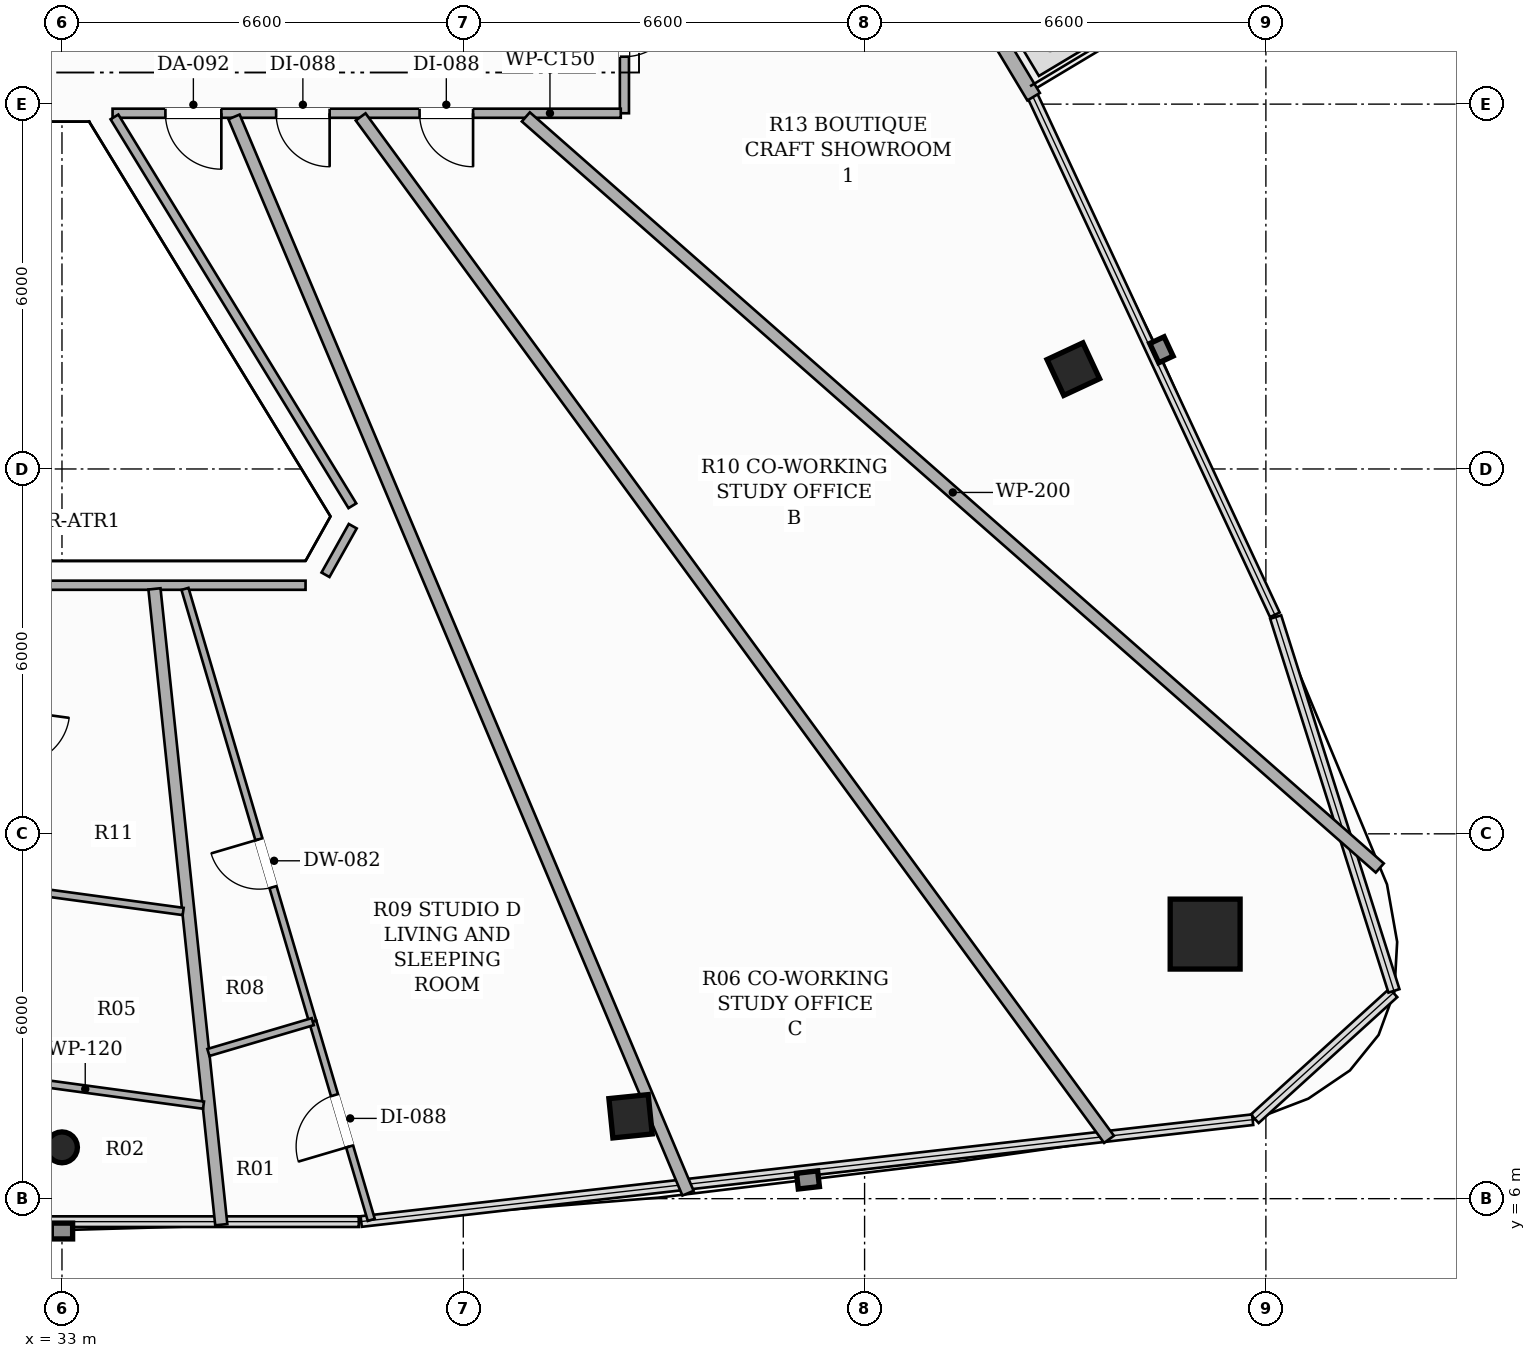
"""IFC4 building model, lengths in metres.
Left out: names, types, materials, properties, quantities, classifications, styles, units other than length and angle.
Written with IfcOpenShell. Run it as: python <this file> out.ifc"""

import sys

from ifc_helpers import new_model, si_unit, direction, frame, frame_2d, origin, origin_2d, place, context, subcontext, project, spatial, rectangle, hollow_rectangle, hollow_circle, extrude, element, fill, save


model = new_model("IFC4")
c1 = context("Model", 3, precision=1e-05, world=origin(), true_north=direction((0.0, 1.0)))
c2 = subcontext(c1, "Body", "Model", "MODEL_VIEW")
j1 = project(units=[si_unit("LENGTHUNIT", "METRE"), si_unit("PLANEANGLEUNIT", "RADIAN")], contexts=[c1])
p1 = place(None, origin())
s1 = spatial("IfcSite", under=j1, at=p1, CompositionType="ELEMENT")
p2 = place(p1, origin())
s2 = spatial("IfcBuilding", under=s1, at=p2, CompositionType="ELEMENT")
p3 = place(p2, frame((0.0, 0.0, 263.45)))
s3 = spatial("IfcBuildingStorey", under=s2, at=p3, CompositionType="ELEMENT", Elevation=263.45)
p4 = place(p3, frame((51.801, 10.351, 0.0), z_axis=(0.0, 0.0, 1.0), x_axis=(1.0, 0.0, 0.0)))
e1 = element("IfcColumn", 1, at=p4, inside=s3, PredefinedType="COLUMN", context=c2, shape_type="SweptSolid", body=[
    extrude(hollow_rectangle(XDim=1.15, YDim=1.15, WallThickness=0.036, at=origin_2d()), origin(), (0.0, 0.0, 1.0), 3.3),
])
p5 = place(p3, frame((33.0, 6.844, 0.0), z_axis=(0.0, 0.0, 1.0), x_axis=(1.0, 0.0, 0.0)))
e2 = element("IfcColumn", 2, at=p5, inside=s3, PredefinedType="COLUMN", context=c2, shape_type="SweptSolid", body=[
    extrude(hollow_circle(Radius=0.254, WallThickness=0.016, at=origin_2d()), origin(), (0.0, 0.0, 1.0), 3.3),
])
for number, where, z_axis, x_axis in (
    (3, (42.351, 7.355, 0.0), (0.0, 0.0, 1.0), (0.995, 0.101, 0.0)),
    (4, (49.633, 19.642, 0.0), (0.0, 0.0, 1.0), (-0.423, 0.906, 0.0)),
):
    element("IfcColumn", number, at=place(p3, frame(where, z_axis=z_axis, x_axis=x_axis)), inside=s3, PredefinedType="COLUMN", context=c2, shape_type="SweptSolid", body=[
        extrude(hollow_rectangle(XDim=0.65, YDim=0.65, WallThickness=0.022, at=origin_2d()), origin(), (0.0, 0.0, 1.0), 3.3),
    ])
p6 = place(p3, frame((48.98, 24.122, 0.0), z_axis=(0.0, 0.0, 1.0), x_axis=(-0.514361929684, 0.857573206958, 0.0)))
e5 = element("IfcWall", 5, at=p6, inside=s3, PredefinedType="SOLIDWALL", context=c2, shape_type="SweptSolid", body=[
    extrude(rectangle(XDim=9.659, YDim=0.24, at=frame_2d((4.829, 0.0))), origin(), (0.0, 0.0, 1.0), 2.624),
])
p7 = place(p6, frame((7.162, 0.0, 0.0)))
e6 = element("IfcOpeningElement", 6, at=p7, cuts=e5, PredefinedType="OPENING", context=c2, shape_type="SweptSolid", body=[
    extrude(rectangle(XDim=1.8, YDim=2.2, at=frame_2d((0.9, 1.1))), frame((0.0, 0.13, 0.0), z_axis=(0.0, -1.0, 0.0), x_axis=(1.0, 0.0, 0.0)), (0.0, 0.0, 1.0), 0.26),
])
p8 = place(p3, frame((42.25, 26.59, 0.0), z_axis=(0.0, 0.0, 1.0), x_axis=(0.0, -1.0, 0.0)))
e7 = element("IfcWall", 7, at=p8, inside=s3, PredefinedType="PARTITIONING", context=c2, shape_type="SweptSolid", body=[
    extrude(rectangle(XDim=2.74, YDim=0.15, at=frame_2d((1.37, 0.0))), origin(), (0.0, 0.0, 1.0), 2.773),
])
p9 = place(p8, frame((0.93, 0.0, 0.0)))
e8 = element("IfcOpeningElement", 8, at=p9, cuts=e7, PredefinedType="OPENING", context=c2, shape_type="SweptSolid", body=[
    extrude(rectangle(XDim=0.88, YDim=2.1, at=frame_2d((0.44, 1.05))), frame((0.0, 0.085, 0.0), z_axis=(0.0, -1.0, 0.0), x_axis=(1.0, 0.0, 0.0)), (0.0, 0.0, 1.0), 0.17),
])
p10 = place(p3, frame((42.19, 23.85, 0.0), z_axis=(0.0, 0.0, 1.0), x_axis=(-1.0, 0.0, 0.0)))
e9 = element("IfcWall", 9, at=p10, inside=s3, PredefinedType="PARTITIONING", context=c2, shape_type="SweptSolid", body=[
    extrude(rectangle(XDim=8.358, YDim=0.15, at=frame_2d((4.179, 0.0))), origin(), (0.0, 0.0, 1.0), 2.565),
])
p11 = place(p10, frame((2.429, 0.0, 0.0)))
e10 = element("IfcOpeningElement", 10, at=p11, cuts=e9, PredefinedType="OPENING", context=c2, shape_type="SweptSolid", body=[
    extrude(rectangle(XDim=0.88, YDim=2.1, at=frame_2d((0.44, 1.05))), frame((0.0, 0.085, 0.0), z_axis=(0.0, -1.0, 0.0), x_axis=(1.0, 0.0, 0.0)), (0.0, 0.0, 1.0), 0.17),
])
p12 = place(p10, frame((4.788, 0.0, 0.0)))
e11 = element("IfcOpeningElement", 11, at=p12, cuts=e9, PredefinedType="OPENING", context=c2, shape_type="SweptSolid", body=[
    extrude(rectangle(XDim=0.88, YDim=2.1, at=frame_2d((0.44, 1.05))), frame((0.0, 0.085, 0.0), z_axis=(0.0, -1.0, 0.0), x_axis=(1.0, 0.0, 0.0)), (0.0, 0.0, 1.0), 0.17),
])
p13 = place(p10, frame((6.569, 0.0, 0.0)))
e12 = element("IfcOpeningElement", 12, at=p13, cuts=e9, PredefinedType="OPENING", context=c2, shape_type="SweptSolid", body=[
    extrude(rectangle(XDim=0.92, YDim=2.15, at=frame_2d((0.46, 1.075))), frame((0.0, 0.085, 0.0), z_axis=(0.0, -1.0, 0.0), x_axis=(1.0, 0.0, 0.0)), (0.0, 0.0, 1.0), 0.17),
])
p14 = place(p3, frame((33.863, 23.79, 0.0), z_axis=(0.0, 0.0, 1.0), x_axis=(0.521913594497, -0.852998358661, 0.0)))
e13 = element("IfcWall", 13, at=p14, inside=s3, PredefinedType="PARTITIONING", context=c2, shape_type="SweptSolid", body=[
    extrude(rectangle(XDim=7.497, YDim=0.15, at=frame_2d((3.749, 0.0))), origin(), (0.0, 0.0, 1.0), 2.773),
])
p15 = place(p3, frame((37.782, 17.059, 0.0), z_axis=(0.0, 0.0, 1.0), x_axis=(-0.489033415255, -0.872265050752, 0.0)))
e14 = element("IfcWall", 14, at=p15, inside=s3, PredefinedType="PARTITIONING", context=c2, shape_type="SweptSolid", body=[
    extrude(rectangle(XDim=0.916, YDim=0.15, at=frame_2d((0.458, 0.0))), origin(), (0.0, 0.0, 1.0), 3.06),
])
p16 = place(p3, frame((37.006, 16.088, 0.0), z_axis=(0.0, 0.0, 1.0), x_axis=(-1.0, 0.0, 0.0)))
e15 = element("IfcWall", 15, at=p16, inside=s3, PredefinedType="PARTITIONING", context=c2, shape_type="SweptSolid", body=[
    extrude(rectangle(XDim=8.012, YDim=0.15, at=frame_2d((4.006, 0.0))), origin(), (0.0, 0.0, 1.0), 2.773),
])
p17 = place(p3, frame((54.673, 11.438, 0.0), z_axis=(0.0, 0.0, 1.0), x_axis=(-0.750894752688, 0.660421888179, 0.0)))
e16 = element("IfcWall", 16, at=p17, inside=s3, PredefinedType="PARTITIONING", context=c2, shape_type="SweptSolid", body=[
    extrude(rectangle(XDim=18.703, YDim=0.2, at=frame_2d((9.352, 0.0))), origin(), (0.0, 0.0, 1.0), 2.492),
])
p18 = place(p3, frame((34.521, 16.028, 0.0), z_axis=(0.0, 0.0, 1.0), x_axis=(0.104542147599, -0.994520456992, 0.0)))
e17 = element("IfcWall", 17, at=p18, inside=s3, PredefinedType="PARTITIONING", context=c2, shape_type="SweptSolid", body=[
    extrude(rectangle(XDim=10.514, YDim=0.2, at=frame_2d((5.257, 0.0))), origin(), (0.0, 0.0, 1.0), 2.492),
])
p19 = place(p3, frame((50.22, 6.976, 0.0), z_axis=(0.0, 0.0, 1.0), x_axis=(-0.59066502199, 0.80691686796, 0.0)))
e18 = element("IfcWall", 18, at=p19, inside=s3, PredefinedType="PARTITIONING", context=c2, shape_type="SweptSolid", body=[
    extrude(rectangle(XDim=20.837, YDim=0.2, at=frame_2d((10.419, 0.0))), origin(), (0.0, 0.0, 1.0), 2.492),
])
p20 = place(p3, frame((43.296, 6.09, 0.0), z_axis=(0.0, 0.0, 1.0), x_axis=(-0.388640997534, 0.921389263578, 0.0)))
e19 = element("IfcWall", 19, at=p20, inside=s3, PredefinedType="PARTITIONING", context=c2, shape_type="SweptSolid", body=[
    extrude(rectangle(XDim=19.21, YDim=0.2, at=frame_2d((9.605, 0.0))), origin(), (0.0, 0.0, 1.0), 2.492),
])
p21 = place(p3, frame((35.328, 7.538, 0.0), z_axis=(0.0, 0.0, 1.0), x_axis=(-0.990890227425, 0.134672035678, 0.0)))
e20 = element("IfcWall", 20, at=p21, inside=s3, PredefinedType="PARTITIONING", context=c2, shape_type="SweptSolid", body=[
    extrude(rectangle(XDim=3.927, YDim=0.12, at=frame_2d((1.963, 0.0))), origin(), (0.0, 0.0, 1.0), 2.773),
])
p22 = place(p3, frame((31.856, 11.15, 0.0), z_axis=(0.0, 0.0, 1.0), x_axis=(0.990862518896, -0.13487575263, 0.0)))
e21 = element("IfcWall", 21, at=p22, inside=s3, PredefinedType="PARTITIONING", context=c2, shape_type="SweptSolid", body=[
    extrude(rectangle(XDim=3.166, YDim=0.12, at=frame_2d((1.583, 0.0))), origin(), (0.0, 0.0, 1.0), 2.773),
])
p23 = place(p3, frame((37.124, 8.911, 0.0), z_axis=(0.0, 0.0, 1.0), x_axis=(-0.283131577199, 0.959081075818, 0.0)))
e22 = element("IfcWall", 22, at=p23, inside=s3, PredefinedType="PARTITIONING", context=c2, shape_type="SweptSolid", body=[
    extrude(rectangle(XDim=7.421, YDim=0.12, at=frame_2d((3.71, 0.0))), origin(), (0.0, 0.0, 1.0), 2.773),
])
p24 = place(p23, frame((2.307, 0.0, 0.0)))
e23 = element("IfcOpeningElement", 23, at=p24, cuts=e22, PredefinedType="OPENING", context=c2, shape_type="SweptSolid", body=[
    extrude(rectangle(XDim=0.82, YDim=2.1, at=frame_2d((0.41, 1.05))), frame((0.0, 0.07, 0.0), z_axis=(0.0, -1.0, 0.0), x_axis=(1.0, 0.0, 0.0)), (0.0, 0.0, 1.0), 0.14),
])
p25 = place(p3, frame((38.087, 5.651, 0.0), z_axis=(0.0, 0.0, 1.0), x_axis=(-0.28300230386, 0.959119229299, 0.0)))
e24 = element("IfcWall", 24, at=p25, inside=s3, PredefinedType="PARTITIONING", context=c2, shape_type="SweptSolid", body=[
    extrude(rectangle(XDim=3.399, YDim=0.12, at=frame_2d((1.699, 0.0))), origin(), (0.0, 0.0, 1.0), 2.492),
])
p26 = place(p25, frame((1.259, 0.0, 0.0)))
e25 = element("IfcOpeningElement", 25, at=p26, cuts=e24, PredefinedType="OPENING", context=c2, shape_type="SweptSolid", body=[
    extrude(rectangle(XDim=0.88, YDim=2.1, at=frame_2d((0.44, 1.05))), frame((0.0, 0.07, 0.0), z_axis=(0.0, -1.0, 0.0), x_axis=(1.0, 0.0, 0.0)), (0.0, 0.0, 1.0), 0.14),
])
p27 = place(p3, frame((37.124, 8.911, 0.0), z_axis=(0.0, 0.0, 1.0), x_axis=(-0.959045510231, -0.283252024362, 0.0)))
e26 = element("IfcWall", 26, at=p27, inside=s3, PredefinedType="PARTITIONING", context=c2, shape_type="SweptSolid", body=[
    extrude(rectangle(XDim=1.789, YDim=0.12, at=frame_2d((0.895, 0.0))), origin(), (0.0, 0.0, 1.0), 3.06),
])
p28 = place(p9, origin())
e27 = element("IfcDoor", 27, at=p28, inside=s3, OperationType="SINGLE_SWING_LEFT", PredefinedType="DOOR", context=c2, shape_type="SweptSolid", body=[
    extrude(rectangle(XDim=0.88, YDim=2.1, at=frame_2d((0.44, 1.05))), frame((0.0, 0.025, 0.0), z_axis=(0.0, -1.0, 0.0), x_axis=(1.0, 0.0, 0.0)), (0.0, 0.0, 1.0), 0.05),
])
fill(e8, e27)
p29 = place(p11, origin())
e28 = element("IfcDoor", 28, at=p29, inside=s3, OperationType="SINGLE_SWING_LEFT", PredefinedType="DOOR", context=c2, shape_type="SweptSolid", body=[
    extrude(rectangle(XDim=0.88, YDim=2.1, at=frame_2d((0.44, 1.05))), frame((0.0, 0.025, 0.0), z_axis=(0.0, -1.0, 0.0), x_axis=(1.0, 0.0, 0.0)), (0.0, 0.0, 1.0), 0.05),
])
fill(e10, e28)
p30 = place(p12, origin())
e29 = element("IfcDoor", 29, at=p30, inside=s3, OperationType="SINGLE_SWING_LEFT", PredefinedType="DOOR", context=c2, shape_type="SweptSolid", body=[
    extrude(rectangle(XDim=0.88, YDim=2.1, at=frame_2d((0.44, 1.05))), frame((0.0, 0.025, 0.0), z_axis=(0.0, -1.0, 0.0), x_axis=(1.0, 0.0, 0.0)), (0.0, 0.0, 1.0), 0.05),
])
fill(e11, e29)
p31 = place(p13, origin())
e30 = element("IfcDoor", 30, at=p31, inside=s3, OperationType="SINGLE_SWING_LEFT", PredefinedType="DOOR", context=c2, shape_type="SweptSolid", body=[
    extrude(rectangle(XDim=0.92, YDim=2.15, at=frame_2d((0.46, 1.075))), frame((0.0, 0.025, 0.0), z_axis=(0.0, -1.0, 0.0), x_axis=(1.0, 0.0, 0.0)), (0.0, 0.0, 1.0), 0.05),
])
fill(e12, e30)
p32 = place(p24, origin())
e31 = element("IfcDoor", 31, at=p32, inside=s3, OperationType="SINGLE_SWING_RIGHT", PredefinedType="DOOR", context=c2, shape_type="SweptSolid", body=[
    extrude(rectangle(XDim=0.82, YDim=2.1, at=frame_2d((0.41, 1.05))), frame((0.0, 0.025, 0.0), z_axis=(0.0, -1.0, 0.0), x_axis=(1.0, 0.0, 0.0)), (0.0, 0.0, 1.0), 0.05),
])
fill(e23, e31)
p33 = place(p26, origin())
e32 = element("IfcDoor", 32, at=p33, inside=s3, OperationType="SINGLE_SWING_LEFT", PredefinedType="DOOR", context=c2, shape_type="SweptSolid", body=[
    extrude(rectangle(XDim=0.88, YDim=2.1, at=frame_2d((0.44, 1.05))), frame((0.0, 0.025, 0.0), z_axis=(0.0, -1.0, 0.0), x_axis=(1.0, 0.0, 0.0)), (0.0, 0.0, 1.0), 0.05),
])
fill(e25, e32)
save(model, sys.argv[1])
